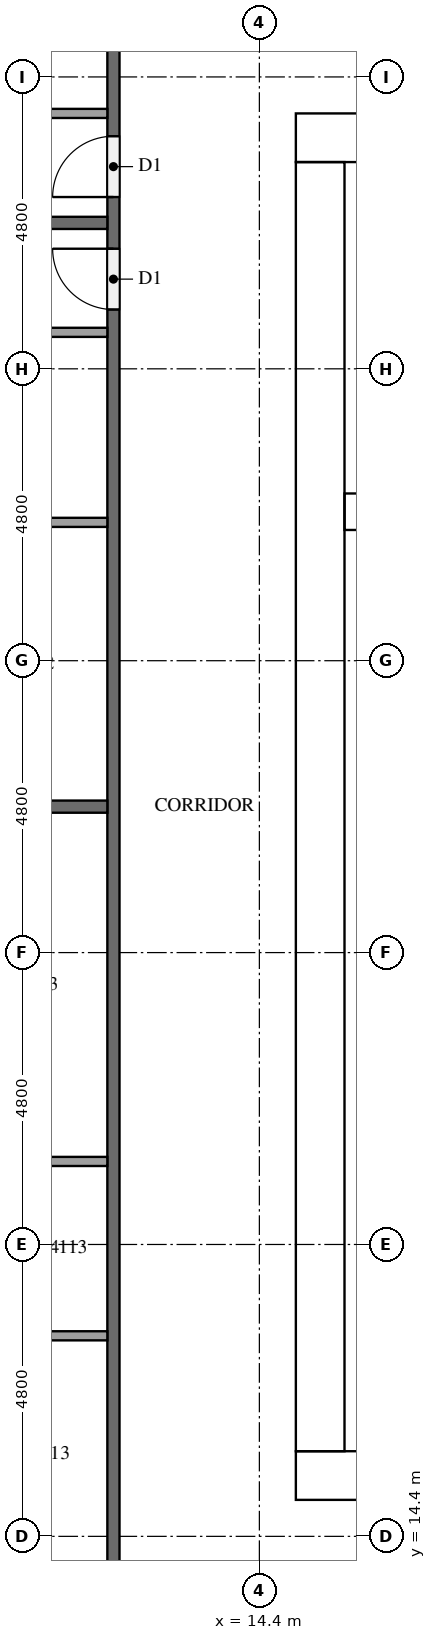
"""IFC4 building model, lengths in metres.
Left out: names, types, materials, properties, quantities, classifications, styles, units other than length and angle.
Written with IfcOpenShell. Run it as: python <this file> out.ifc"""

import sys

from ifc_helpers import new_model, si_unit, direction, frame, frame_2d, origin, place, context, subcontext, project, spatial, rectangle, extrude, element, fill, save


model = new_model("IFC4")
c1 = context("Model", 3, precision=1e-05, world=origin(), true_north=direction((0.0, 1.0)))
c2 = subcontext(c1, "Body", "Model", "MODEL_VIEW")
j1 = project(units=[si_unit("LENGTHUNIT", "METRE"), si_unit("PLANEANGLEUNIT", "RADIAN")], contexts=[c1])
p1 = place(None, origin())
s1 = spatial("IfcSite", under=j1, at=p1, CompositionType="ELEMENT")
p2 = place(p1, origin())
s2 = spatial("IfcBuilding", under=s1, at=p2, CompositionType="ELEMENT")
p3 = place(p2, frame((0.0, 0.0, 159.5)))
s3 = spatial("IfcBuildingStorey", under=s2, at=p3, CompositionType="ELEMENT", Elevation=159.5)
p4 = place(p3, frame((15.0, 15.4, 0.0), z_axis=(0.0, 0.0, 1.0), x_axis=(1.0, 0.0, 0.0)))
e1 = element("IfcWall", 1, at=p4, inside=s3, PredefinedType="SHEAR", context=c2, shape_type="SweptSolid", body=[
    extrude(rectangle(XDim=32.4, YDim=0.8, at=frame_2d((16.2, 0.0))), origin(), (0.0, 0.0, 1.0), 3.2),
])
p5 = place(p4, frame((15.3, 0.0, 0.0)))
e2 = element("IfcOpeningElement", 2, at=p5, cuts=e1, PredefinedType="OPENING", context=c2, shape_type="SweptSolid", body=[
    extrude(rectangle(XDim=1.8, YDim=2.1, at=frame_2d((0.9, 1.05))), frame((0.0, 0.41, 0.0), z_axis=(0.0, -1.0, 0.0), x_axis=(1.0, 0.0, 0.0)), (0.0, 0.0, 1.0), 0.82),
])
p6 = place(p3, frame((15.0, 37.4, 0.0), z_axis=(0.0, 0.0, 1.0), x_axis=(1.0, 0.0, 0.0)))
e3 = element("IfcWall", 3, at=p6, inside=s3, PredefinedType="SHEAR", context=c2, shape_type="SweptSolid", body=[
    extrude(rectangle(XDim=32.4, YDim=0.8, at=frame_2d((16.2, 0.0))), origin(), (0.0, 0.0, 1.0), 3.2),
])
p7 = place(p6, frame((15.3, 0.0, 0.0)))
e4 = element("IfcOpeningElement", 4, at=p7, cuts=e3, PredefinedType="OPENING", context=c2, shape_type="SweptSolid", body=[
    extrude(rectangle(XDim=1.8, YDim=2.1, at=frame_2d((0.9, 1.05))), frame((0.0, 0.41, 0.0), z_axis=(0.0, -1.0, 0.0), x_axis=(1.0, 0.0, 0.0)), (0.0, 0.0, 1.0), 0.82),
])
p8 = place(p6, frame((1.51, 0.0, 0.0)))
e5 = element("IfcOpeningElement", 5, at=p8, cuts=e3, PredefinedType="OPENING", context=c2, shape_type="SweptSolid", body=[
    extrude(rectangle(XDim=1.0, YDim=2.1, at=frame_2d((0.5, 1.05))), frame((0.0, 0.41, 0.0), z_axis=(0.0, -1.0, 0.0), x_axis=(1.0, 0.0, 0.0)), (0.0, 0.0, 1.0), 0.82),
])
p9 = place(p6, frame((5.11, 0.0, 0.0)))
e6 = element("IfcOpeningElement", 6, at=p9, cuts=e3, PredefinedType="OPENING", context=c2, shape_type="SweptSolid", body=[
    extrude(rectangle(XDim=1.0, YDim=2.1, at=frame_2d((0.5, 1.05))), frame((0.0, 0.41, 0.0), z_axis=(0.0, -1.0, 0.0), x_axis=(1.0, 0.0, 0.0)), (0.0, 0.0, 1.0), 0.82),
])
p10 = place(p3, frame((15.4, 15.8, 0.0), z_axis=(0.0, 0.0, 1.0), x_axis=(0.0, 1.0, 0.0)))
e7 = element("IfcWall", 7, at=p10, inside=s3, PredefinedType="SHEAR", context=c2, shape_type="SweptSolid", body=[
    extrude(rectangle(XDim=21.2, YDim=0.8, at=frame_2d((10.6, 0.0))), origin(), (0.0, 0.0, 1.0), 3.2),
])
p11 = place(p10, frame((4.96, 0.0, 0.0)))
e8 = element("IfcOpeningElement", 8, at=p11, cuts=e7, PredefinedType="OPENING", context=c2, shape_type="SweptSolid", body=[
    extrude(rectangle(XDim=1.2, YDim=2.1, at=frame_2d((0.6, 1.05))), frame((0.0, 0.41, 0.0), z_axis=(0.0, -1.0, 0.0), x_axis=(1.0, 0.0, 0.0)), (0.0, 0.0, 1.0), 0.82),
])
p12 = place(p3, frame((15.8, 31.25, 0.0), z_axis=(0.0, 0.0, 1.0), x_axis=(1.0, 0.0, 0.0)))
e9 = element("IfcWall", 9, at=p12, inside=s3, PredefinedType="SHEAR", context=c2, shape_type="SweptSolid", body=[
    extrude(rectangle(XDim=7.0, YDim=0.6, at=frame_2d((3.5, 0.0))), origin(), (0.0, 0.0, 1.0), 3.2),
])
p13 = place(p3, frame((12.0, 12.1, 0.0), z_axis=(0.0, 0.0, 1.0), x_axis=(0.0, 1.0, 0.0)))
e10 = element("IfcWall", 10, at=p13, inside=s3, PredefinedType="PARTITIONING", context=c2, shape_type="SweptSolid", body=[
    extrude(rectangle(XDim=28.6, YDim=0.2, at=frame_2d((14.3, 0.0))), origin(), (0.0, 0.0, 1.0), 3.2),
])
p14 = place(p13, frame((24.325, 0.0, 0.0)))
e11 = element("IfcOpeningElement", 11, at=p14, cuts=e10, PredefinedType="OPENING", context=c2, shape_type="SweptSolid", body=[
    extrude(rectangle(XDim=1.0, YDim=2.1, at=frame_2d((0.5, 1.05))), frame((0.0, 0.11, 0.0), z_axis=(0.0, -1.0, 0.0), x_axis=(1.0, 0.0, 0.0)), (0.0, 0.0, 1.0), 0.22),
])
p15 = place(p13, frame((22.475, 0.0, 0.0)))
e12 = element("IfcOpeningElement", 12, at=p15, cuts=e10, PredefinedType="OPENING", context=c2, shape_type="SweptSolid", body=[
    extrude(rectangle(XDim=1.0, YDim=2.1, at=frame_2d((0.5, 1.05))), frame((0.0, 0.11, 0.0), z_axis=(0.0, -1.0, 0.0), x_axis=(1.0, 0.0, 0.0)), (0.0, 0.0, 1.0), 0.22),
])
p16 = place(p13, frame((0.325, 0.0, 0.0)))
e13 = element("IfcOpeningElement", 13, at=p16, cuts=e10, PredefinedType="OPENING", context=c2, shape_type="SweptSolid", body=[
    extrude(rectangle(XDim=1.0, YDim=2.1, at=frame_2d((0.5, 1.05))), frame((0.0, 0.11, 0.0), z_axis=(0.0, -1.0, 0.0), x_axis=(1.0, 0.0, 0.0)), (0.0, 0.0, 1.0), 0.22),
])
for number, where, z_axis, x_axis in (
    (14, (0.1, 36.0, 0.0), (0.0, 0.0, 1.0), (1.0, 0.0, 0.0)),
    (15, (0.1, 26.4, 0.0), (0.0, 0.0, 1.0), (1.0, 0.0, 0.0)),
):
    element("IfcWall", number, at=place(p3, frame(where, z_axis=z_axis, x_axis=x_axis)), inside=s3, PredefinedType="PARTITIONING", context=c2, shape_type="SweptSolid", body=[
        extrude(rectangle(XDim=11.8, YDim=0.2, at=frame_2d((5.9, 0.0))), origin(), (0.0, 0.0, 1.0), 3.2),
    ])
p17 = place(p3, frame((11.9, 37.8, 0.0), z_axis=(0.0, 0.0, 1.0), x_axis=(-1.0, 0.0, 0.0)))
e16 = element("IfcWall", 16, at=p17, inside=s3, PredefinedType="PARTITIONING", context=c2, shape_type="SweptSolid", body=[
    extrude(rectangle(XDim=3.125, YDim=0.15, at=frame_2d((1.562, 0.0))), origin(), (0.0, 0.0, 1.0), 3.2),
])
p18 = place(p3, frame((11.9, 31.075, 0.0), z_axis=(0.0, 0.0, 1.0), x_axis=(-1.0, 0.0, 0.0)))
e17 = element("IfcWall", 17, at=p18, inside=s3, PredefinedType="PARTITIONING", context=c2, shape_type="SweptSolid", body=[
    extrude(rectangle(XDim=3.875, YDim=0.15, at=frame_2d((1.938, 0.0))), origin(), (0.0, 0.0, 1.0), 3.2),
])
p19 = place(p3, frame((11.9, 34.2, 0.0), z_axis=(0.0, 0.0, 1.0), x_axis=(-1.0, 0.0, 0.0)))
e18 = element("IfcWall", 18, at=p19, inside=s3, PredefinedType="PARTITIONING", context=c2, shape_type="SweptSolid", body=[
    extrude(rectangle(XDim=4.025, YDim=0.15, at=frame_2d((2.012, 0.0))), origin(), (0.0, 0.0, 1.0), 3.2),
])
for number, where, z_axis, x_axis in (
    (19, (11.9, 17.698, 0.0), (0.0, 0.0, 1.0), (-1.0, 0.0, 0.0)),
    (20, (11.9, 20.565, 0.0), (0.0, 0.0, 1.0), (-1.0, 0.0, 0.0)),
):
    element("IfcWall", number, at=place(p3, frame(where, z_axis=z_axis, x_axis=x_axis)), inside=s3, PredefinedType="PARTITIONING", context=c2, shape_type="SweptSolid", body=[
        extrude(rectangle(XDim=3.725, YDim=0.15, at=frame_2d((1.862, 0.0))), origin(), (0.0, 0.0, 1.0), 3.2),
    ])
p20 = place(p11, frame((1.2, 0.0, 0.0), z_axis=(0.0, 0.0, 1.0), x_axis=(-1.0, 0.0, 0.0)))
e21 = element("IfcDoor", 21, at=p20, inside=s3, OperationType="SINGLE_SWING_RIGHT", PredefinedType="DOOR", context=c2, shape_type="SweptSolid", body=[
    extrude(rectangle(XDim=1.2, YDim=2.1, at=frame_2d((0.6, 1.05))), frame((0.0, 0.025, 0.0), z_axis=(0.0, -1.0, 0.0), x_axis=(1.0, 0.0, 0.0)), (0.0, 0.0, 1.0), 0.05),
])
fill(e8, e21)
p21 = place(p14, origin())
e22 = element("IfcDoor", 22, at=p21, inside=s3, OperationType="SINGLE_SWING_LEFT", PredefinedType="DOOR", context=c2, shape_type="SweptSolid", body=[
    extrude(rectangle(XDim=1.0, YDim=2.1, at=frame_2d((0.5, 1.05))), frame((0.0, 0.025, 0.0), z_axis=(0.0, -1.0, 0.0), x_axis=(1.0, 0.0, 0.0)), (0.0, 0.0, 1.0), 0.05),
])
fill(e11, e22)
p22 = place(p15, origin())
e23 = element("IfcDoor", 23, at=p22, inside=s3, OperationType="SINGLE_SWING_RIGHT", PredefinedType="DOOR", context=c2, shape_type="SweptSolid", body=[
    extrude(rectangle(XDim=1.0, YDim=2.1, at=frame_2d((0.5, 1.05))), frame((0.0, 0.025, 0.0), z_axis=(0.0, -1.0, 0.0), x_axis=(1.0, 0.0, 0.0)), (0.0, 0.0, 1.0), 0.05),
])
fill(e12, e23)
save(model, sys.argv[1])
